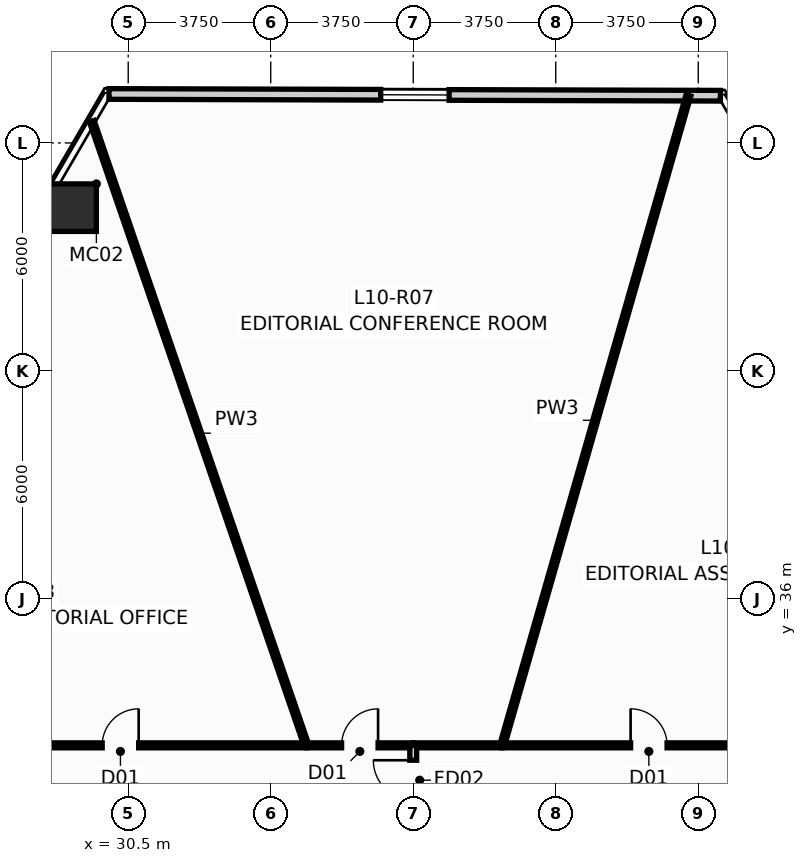
"""IFC4 building model, lengths in metres.
Left out: names, types, materials, properties, quantities, classifications, styles, units other than length and angle.
Written with IfcOpenShell. Run it as: python <this file> out.ifc"""

import sys

from ifc_helpers import new_model, si_unit, direction, frame, frame_2d, origin, origin_2d, place, context, subcontext, project, spatial, rectangle, hollow_rectangle, extrude, source, transform, mapped, element, fill, save


model = new_model("IFC4")
c1 = context("Model", 3, precision=1e-05, world=origin(), true_north=direction((0.0, 1.0)))
c2 = subcontext(c1, "Body", "Model", "MODEL_VIEW")
j1 = project(units=[si_unit("LENGTHUNIT", "METRE"), si_unit("PLANEANGLEUNIT", "RADIAN")], contexts=[c1])
p1 = place(None, origin())
s1 = spatial("IfcSite", under=j1, at=p1, CompositionType="ELEMENT")
p2 = place(p1, origin())
s2 = spatial("IfcBuilding", under=s1, at=p2, CompositionType="ELEMENT")
p3 = place(p2, frame((0.0, 0.0, 42.2)))
s3 = spatial("IfcBuildingStorey", under=s2, at=p3, CompositionType="ELEMENT", Elevation=42.2)
m1 = source(origin(), c2, "Body", "SweptSolid", [
    extrude(hollow_rectangle(XDim=1.25, YDim=1.25, WallThickness=0.07, at=origin_2d()), origin(), (0.0, 0.0, 1.0), 3.651),
])
for number, where, z_axis, x_axis in (
    (1, (46.963, 46.298, 0.0), (-0.024, 0.002, 1.0), (-0.075, -0.997, 0.0)),
    (2, (29.037, 46.298, 0.0), (0.024, 0.002, 1.0), (-0.075, 0.997, 0.0)),
):
    element("IfcColumn", number, at=place(p3, frame(where, z_axis=z_axis, x_axis=x_axis)), inside=s3, PredefinedType="COLUMN", context=c2, shape_type="MappedRepresentation", body=[
        mapped(m1, transform((0.0, 0.0, 0.0), scale=1.0)),
    ])
p4 = place(p3, frame((29.994, 49.289, 0.0), z_axis=(0.0, 0.0, 1.0), x_axis=(0.999995974555, -0.002837406073, 0.0)))
e3 = element("IfcWall", 3, at=p4, inside=s3, PredefinedType="STANDARD", context=c2, shape_type="SweptSolid", body=[
    extrude(rectangle(XDim=16.09, YDim=0.28, at=frame_2d((8.045, 0.0))), origin(), (0.0, 0.0, 1.0), 3.4),
])
p5 = place(p4, frame((7.15, 0.0, 0.9)))
e4 = element("IfcOpeningElement", 4, at=p5, cuts=e3, PredefinedType="OPENING", context=c2, shape_type="SweptSolid", body=[
    extrude(rectangle(XDim=1.8, YDim=1.8, at=frame_2d((0.9, 0.9))), frame((0.0, 0.152, 0.0), z_axis=(0.0, -1.0, 0.0), x_axis=(1.0, 0.0, 0.0)), (0.0, 0.0, 1.0), 0.304),
])
p6 = place(p3, frame((40.341, 32.155, 0.0), z_axis=(0.0, 0.0, 1.0), x_axis=(0.275547812752, 0.961287367486, 0.0)))
e5 = element("IfcWall", 5, at=p6, inside=s3, PredefinedType="PARTITIONING", context=c2, shape_type="SweptSolid", body=[
    extrude(rectangle(XDim=17.784, YDim=0.13, at=frame_2d((8.892, 0.0))), origin(), (0.0, 0.0, 1.0), 3.4),
])
p7 = place(p3, frame((29.541, 48.572, 0.0), z_axis=(0.0, 0.0, 1.0), x_axis=(0.325283737288, -0.945616460441, 0.0)))
e6 = element("IfcWall", 6, at=p7, inside=s3, PredefinedType="PARTITIONING", context=c2, shape_type="SweptSolid", body=[
    extrude(rectangle(XDim=17.361, YDim=0.13, at=frame_2d((8.68, 0.0))), origin(), (0.0, 0.0, 1.0), 3.4),
])
p8 = place(p3, frame((25.405, 32.15, 0.0), z_axis=(0.0, 0.0, 1.0), x_axis=(1.0, 0.0, 0.0)))
e7 = element("IfcWall", 7, at=p8, inside=s3, PredefinedType="PARTITIONING", context=c2, shape_type="SweptSolid", body=[
    extrude(rectangle(XDim=9.78, YDim=0.13, at=frame_2d((4.89, 0.0))), origin(), (0.0, 0.0, 1.0), 3.4),
])
p9 = place(p8, frame((4.41, 0.0, 0.0)))
e8 = element("IfcOpeningElement", 8, at=p9, cuts=e7, PredefinedType="OPENING", context=c2, shape_type="SweptSolid", body=[
    extrude(rectangle(XDim=0.96, YDim=2.15, at=frame_2d((0.48, 1.075))), frame((0.0, 0.077, 0.0), z_axis=(0.0, -1.0, 0.0), x_axis=(1.0, 0.0, 0.0)), (0.0, 0.0, 1.0), 0.154),
])
p10 = place(p3, frame((40.345, 32.15, 0.0), z_axis=(0.0, 0.0, 1.0), x_axis=(1.0, 0.0, 0.0)))
e9 = element("IfcWall", 9, at=p10, inside=s3, PredefinedType="PARTITIONING", context=c2, shape_type="SweptSolid", body=[
    extrude(rectangle(XDim=7.71, YDim=0.13, at=frame_2d((3.855, 0.0))), origin(), (0.0, 0.0, 1.0), 3.4),
])
p11 = place(p10, frame((3.375, 0.0, 0.0)))
e10 = element("IfcOpeningElement", 10, at=p11, cuts=e9, PredefinedType="OPENING", context=c2, shape_type="SweptSolid", body=[
    extrude(rectangle(XDim=0.96, YDim=2.15, at=frame_2d((0.48, 1.075))), frame((0.0, 0.077, 0.0), z_axis=(0.0, -1.0, 0.0), x_axis=(1.0, 0.0, 0.0)), (0.0, 0.0, 1.0), 0.154),
])
p12 = place(p3, frame((35.195, 32.15, 0.0), z_axis=(0.0, 0.0, 1.0), x_axis=(1.0, 0.0, 0.0)))
e11 = element("IfcWall", 11, at=p12, inside=s3, PredefinedType="PARTITIONING", context=c2, shape_type="SweptSolid", body=[
    extrude(rectangle(XDim=2.8, YDim=0.13, at=frame_2d((1.4, 0.0))), origin(), (0.0, 0.0, 1.0), 3.4),
])
p13 = place(p12, frame((0.92, 0.0, 0.0)))
e12 = element("IfcOpeningElement", 12, at=p13, cuts=e11, PredefinedType="OPENING", context=c2, shape_type="SweptSolid", body=[
    extrude(rectangle(XDim=0.96, YDim=2.15, at=frame_2d((0.48, 1.075))), frame((0.0, 0.077, 0.0), z_axis=(0.0, -1.0, 0.0), x_axis=(1.0, 0.0, 0.0)), (0.0, 0.0, 1.0), 0.154),
])
p14 = place(p3, frame((38.005, 32.15, 0.0), z_axis=(0.0, 0.0, 1.0), x_axis=(1.0, 0.0, 0.0)))
e13 = element("IfcWall", 13, at=p14, inside=s3, PredefinedType="PARTITIONING", context=c2, shape_type="SweptSolid", body=[
    extrude(rectangle(XDim=2.33, YDim=0.13, at=frame_2d((1.165, 0.0))), origin(), (0.0, 0.0, 1.0), 3.4),
])
p15 = place(p3, frame((38.0, 30.32, 0.0), z_axis=(0.0, 0.0, 1.0), x_axis=(0.0, 1.0, 0.0)))
e14 = element("IfcWall", 14, at=p15, inside=s3, PredefinedType="PARTITIONING", context=c2, shape_type="SweptSolid", body=[
    extrude(rectangle(XDim=1.825, YDim=0.18, at=frame_2d((0.913, 0.0))), origin(), (0.0, 0.0, 1.0), 3.4),
])
p16 = place(p15, frame((0.388, 0.0, 0.0)))
e15 = element("IfcOpeningElement", 15, at=p16, cuts=e14, PredefinedType="OPENING", context=c2, shape_type="SweptSolid", body=[
    extrude(rectangle(XDim=1.05, YDim=2.15, at=frame_2d((0.525, 1.075))), frame((0.0, 0.102, 0.0), z_axis=(0.0, -1.0, 0.0), x_axis=(1.0, 0.0, 0.0)), (0.0, 0.0, 1.0), 0.204),
])
p17 = place(p5, origin())
e16 = element("IfcWindow", 16, at=p17, inside=s3, PartitioningType="SINGLE_PANEL", PredefinedType="WINDOW", context=c2, shape_type="SweptSolid", body=[
    extrude(rectangle(XDim=1.8, YDim=1.8, at=frame_2d((0.9, 0.9))), frame((0.0, 0.03, 0.0), z_axis=(0.0, -1.0, 0.0), x_axis=(1.0, 0.0, 0.0)), (0.0, 0.0, 1.0), 0.06),
])
fill(e4, e16)
p18 = place(p9, origin())
e17 = element("IfcDoor", 17, at=p18, inside=s3, OperationType="SINGLE_SWING_RIGHT", PredefinedType="DOOR", context=c2, shape_type="SweptSolid", body=[
    extrude(rectangle(XDim=0.96, YDim=2.15, at=frame_2d((0.48, 1.075))), frame((0.0, 0.025, 0.0), z_axis=(0.0, -1.0, 0.0), x_axis=(1.0, 0.0, 0.0)), (0.0, 0.0, 1.0), 0.05),
])
fill(e8, e17)
p19 = place(p11, origin())
e18 = element("IfcDoor", 18, at=p19, inside=s3, OperationType="SINGLE_SWING_LEFT", PredefinedType="DOOR", context=c2, shape_type="SweptSolid", body=[
    extrude(rectangle(XDim=0.96, YDim=2.15, at=frame_2d((0.48, 1.075))), frame((0.0, 0.025, 0.0), z_axis=(0.0, -1.0, 0.0), x_axis=(1.0, 0.0, 0.0)), (0.0, 0.0, 1.0), 0.05),
])
fill(e10, e18)
p20 = place(p13, origin())
e19 = element("IfcDoor", 19, at=p20, inside=s3, OperationType="SINGLE_SWING_RIGHT", PredefinedType="DOOR", context=c2, shape_type="SweptSolid", body=[
    extrude(rectangle(XDim=0.96, YDim=2.15, at=frame_2d((0.48, 1.075))), frame((0.0, 0.025, 0.0), z_axis=(0.0, -1.0, 0.0), x_axis=(1.0, 0.0, 0.0)), (0.0, 0.0, 1.0), 0.05),
])
fill(e12, e19)
p21 = place(p16, origin())
e20 = element("IfcDoor", 20, at=p21, inside=s3, OperationType="SINGLE_SWING_RIGHT", PredefinedType="DOOR", context=c2, shape_type="SweptSolid", body=[
    extrude(rectangle(XDim=1.05, YDim=2.15, at=frame_2d((0.525, 1.075))), frame((0.0, 0.025, 0.0), z_axis=(0.0, -1.0, 0.0), x_axis=(1.0, 0.0, 0.0)), (0.0, 0.0, 1.0), 0.05),
])
fill(e15, e20)
save(model, sys.argv[1])
